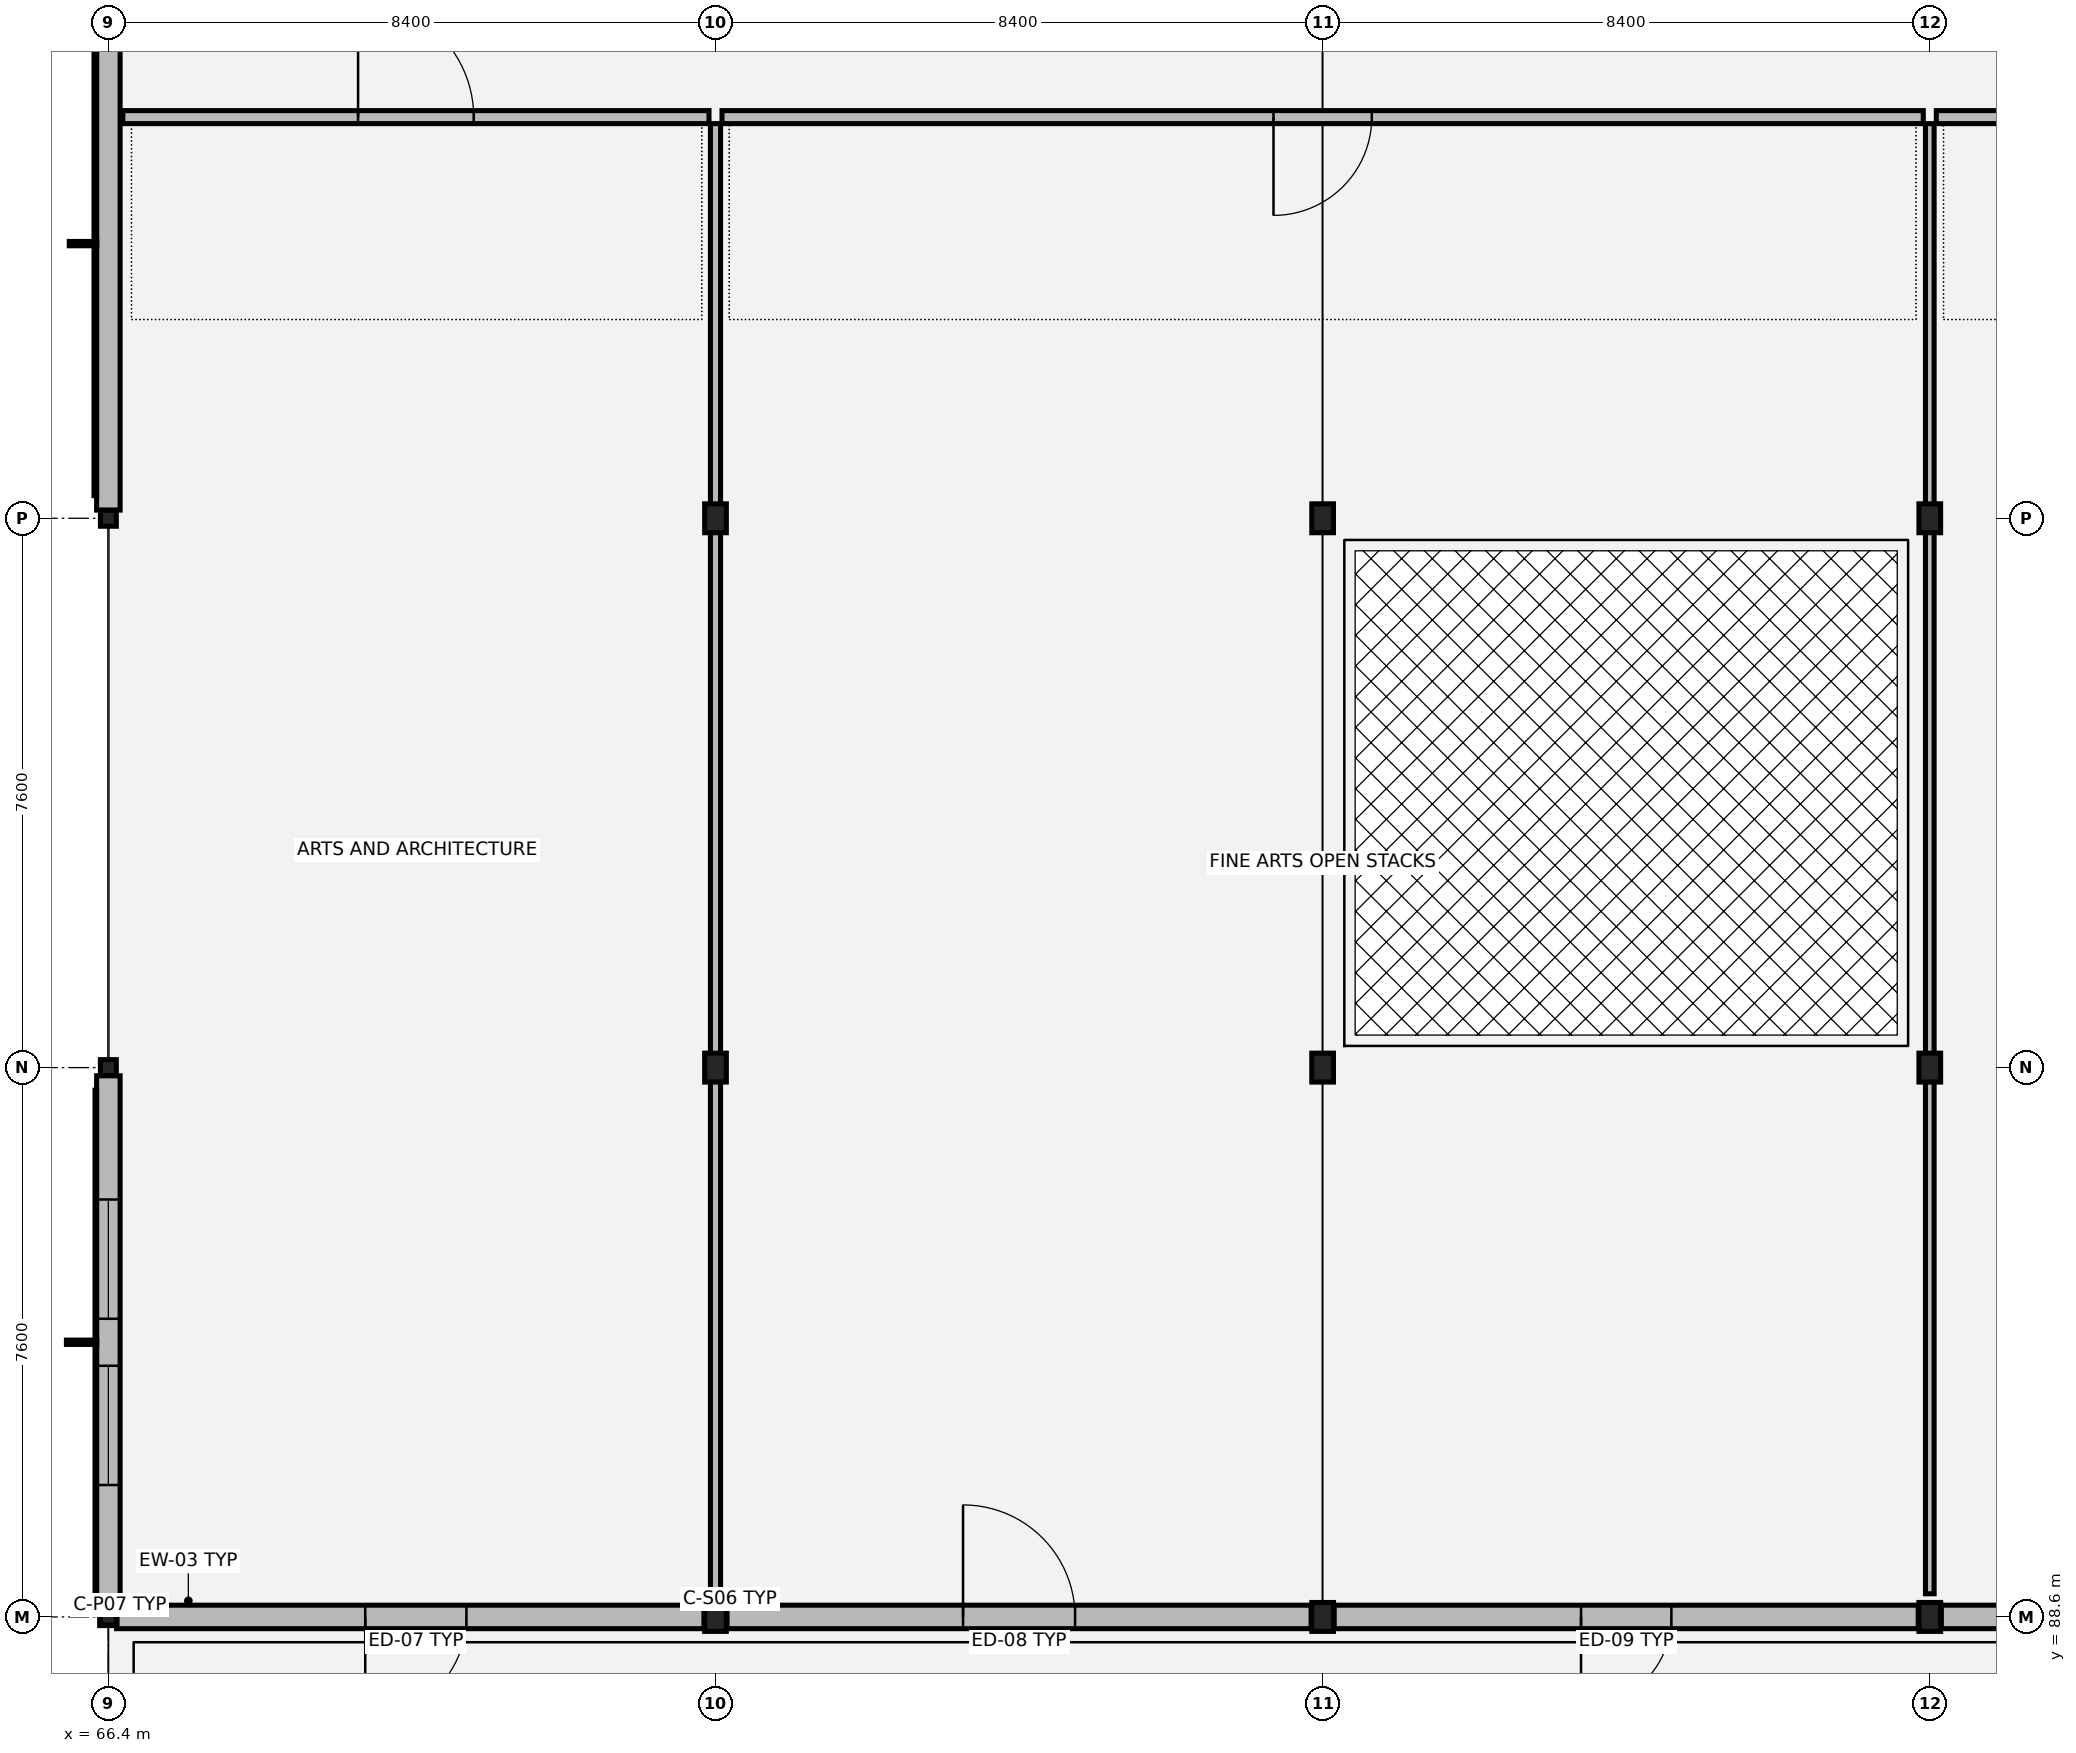
"""IFC4 building model, lengths in metres.
Left out: names, types, materials, properties, quantities, classifications, styles, units other than length and angle.
Written with IfcOpenShell. Run it as: python <this file> out.ifc"""

import sys

from ifc_helpers import new_model, si_unit, direction, frame, frame_2d, origin, origin_2d, place, context, subcontext, project, spatial, rectangle, hollow_rectangle, i_section, extrude, element, fill, save


model = new_model("IFC4")
c1 = context("Model", 3, precision=1e-05, world=origin(), true_north=direction((0.0, 1.0)))
c2 = subcontext(c1, "Body", "Model", "MODEL_VIEW")
j1 = project(units=[si_unit("LENGTHUNIT", "METRE"), si_unit("PLANEANGLEUNIT", "RADIAN")], contexts=[c1])
p1 = place(None, origin())
s1 = spatial("IfcSite", under=j1, at=p1, CompositionType="ELEMENT")
p2 = place(p1, origin())
s2 = spatial("IfcBuilding", under=s1, at=p2, CompositionType="ELEMENT")
p3 = place(p2, frame((0.0, 0.0, 13.26)))
s3 = spatial("IfcBuildingStorey", under=s2, at=p3, CompositionType="ELEMENT", Elevation=13.26)
p4 = place(p3, frame((66.4, 88.6, 0.0), z_axis=(0.0, 0.0, 1.0), x_axis=(1.0, 0.0, 0.0)))
e1 = element("IfcColumn", 1, at=p4, inside=s3, PredefinedType="COLUMN", context=c2, shape_type="SweptSolid", body=[
    extrude(hollow_rectangle(XDim=0.22, YDim=0.22, WallThickness=0.01, at=origin_2d()), origin(), (0.0, 0.0, 1.0), 3.885),
])
for number, where, z_axis, x_axis in (
    (2, (66.4, 96.2, 0.0), (0.0, 0.0, 1.0), (1.0, 0.0, 0.0)),
    (3, (66.4, 103.8, 0.0), (0.0, 0.0, 1.0), (1.0, 0.0, 0.0)),
):
    element("IfcColumn", number, at=place(p3, frame(where, z_axis=z_axis, x_axis=x_axis)), inside=s3, PredefinedType="COLUMN", context=c2, shape_type="SweptSolid", body=[
        extrude(hollow_rectangle(XDim=0.22, YDim=0.22, WallThickness=0.01, at=origin_2d()), origin(), (0.0, 0.0, 1.0), 4.055),
    ])
p5 = place(p3, frame((74.8, 88.6, 0.0), z_axis=(0.0, 0.0, 1.0), x_axis=(1.0, 0.0, 0.0)))
e4 = element("IfcColumn", 4, at=p5, inside=s3, PredefinedType="COLUMN", context=c2, shape_type="SweptSolid", body=[
    extrude(i_section(OverallWidth=0.3, OverallDepth=0.4, WebThickness=0.013, FlangeThickness=0.024, at=origin_2d()), origin(), (0.0, 0.0, 1.0), 3.885),
])
for number, where, z_axis, x_axis in (
    (5, (74.8, 96.2, 0.0), (0.0, 0.0, 1.0), (1.0, 0.0, 0.0)),
    (6, (74.8, 103.8, 0.0), (0.0, 0.0, 1.0), (1.0, 0.0, 0.0)),
):
    element("IfcColumn", number, at=place(p3, frame(where, z_axis=z_axis, x_axis=x_axis)), inside=s3, PredefinedType="COLUMN", context=c2, shape_type="SweptSolid", body=[
        extrude(i_section(OverallWidth=0.3, OverallDepth=0.4, WebThickness=0.013, FlangeThickness=0.024, at=origin_2d()), origin(), (0.0, 0.0, 1.0), 4.055),
    ])
p6 = place(p3, frame((83.2, 88.6, 0.0), z_axis=(0.0, 0.0, 1.0), x_axis=(1.0, 0.0, 0.0)))
e7 = element("IfcColumn", 7, at=p6, inside=s3, PredefinedType="COLUMN", context=c2, shape_type="SweptSolid", body=[
    extrude(i_section(OverallWidth=0.3, OverallDepth=0.4, WebThickness=0.013, FlangeThickness=0.024, at=origin_2d()), origin(), (0.0, 0.0, 1.0), 3.885),
])
for number, where, z_axis, x_axis in (
    (8, (83.2, 96.2, 0.0), (0.0, 0.0, 1.0), (1.0, 0.0, 0.0)),
    (9, (83.2, 103.8, 0.0), (0.0, 0.0, 1.0), (1.0, 0.0, 0.0)),
):
    element("IfcColumn", number, at=place(p3, frame(where, z_axis=z_axis, x_axis=x_axis)), inside=s3, PredefinedType="COLUMN", context=c2, shape_type="SweptSolid", body=[
        extrude(i_section(OverallWidth=0.3, OverallDepth=0.4, WebThickness=0.013, FlangeThickness=0.024, at=origin_2d()), origin(), (0.0, 0.0, 1.0), 4.055),
    ])
p7 = place(p3, frame((91.6, 88.6, 0.0), z_axis=(0.0, 0.0, 1.0), x_axis=(1.0, 0.0, 0.0)))
e10 = element("IfcColumn", 10, at=p7, inside=s3, PredefinedType="COLUMN", context=c2, shape_type="SweptSolid", body=[
    extrude(i_section(OverallWidth=0.3, OverallDepth=0.4, WebThickness=0.013, FlangeThickness=0.024, at=origin_2d()), origin(), (0.0, 0.0, 1.0), 3.885),
])
for number, where, z_axis, x_axis in (
    (11, (91.6, 96.2, 0.0), (0.0, 0.0, 1.0), (1.0, 0.0, 0.0)),
    (12, (91.6, 103.8, 0.0), (0.0, 0.0, 1.0), (1.0, 0.0, 0.0)),
):
    element("IfcColumn", number, at=place(p3, frame(where, z_axis=z_axis, x_axis=x_axis)), inside=s3, PredefinedType="COLUMN", context=c2, shape_type="SweptSolid", body=[
        extrude(i_section(OverallWidth=0.3, OverallDepth=0.4, WebThickness=0.013, FlangeThickness=0.024, at=origin_2d()), origin(), (0.0, 0.0, 1.0), 4.055),
    ])
p8 = place(p3, frame((66.513, 88.6, 0.0), z_axis=(0.0, 0.0, 1.0), x_axis=(1.0, 0.0, 0.0)))
e13 = element("IfcWall", 13, at=p8, inside=s3, PredefinedType="SOLIDWALL", context=c2, shape_type="SweptSolid", body=[
    extrude(rectangle(XDim=8.281, YDim=0.325, at=frame_2d((4.141, 0.0))), origin(), (0.0, 0.0, 1.0), 3.22),
])
p9 = place(p8, frame((3.441, 0.0, 0.0)))
e14 = element("IfcOpeningElement", 14, at=p9, cuts=e13, PredefinedType="OPENING", context=c2, shape_type="SweptSolid", body=[
    extrude(rectangle(XDim=1.4, YDim=2.25, at=frame_2d((0.7, 1.125))), frame((0.0, 0.172, 0.0), z_axis=(0.0, -1.0, 0.0), x_axis=(1.0, 0.0, 0.0)), (0.0, 0.0, 1.0), 0.345),
])
p10 = place(p3, frame((74.806, 88.6, 0.0), z_axis=(0.0, 0.0, 1.0), x_axis=(1.0, 0.0, 0.0)))
e15 = element("IfcWall", 15, at=p10, inside=s3, PredefinedType="SOLIDWALL", context=c2, shape_type="SweptSolid", body=[
    extrude(rectangle(XDim=8.388, YDim=0.325, at=frame_2d((4.194, 0.0))), origin(), (0.0, 0.0, 1.0), 3.22),
])
p11 = place(p10, frame((3.419, 0.0, 0.0)))
e16 = element("IfcOpeningElement", 16, at=p11, cuts=e15, PredefinedType="OPENING", context=c2, shape_type="SweptSolid", body=[
    extrude(rectangle(XDim=1.55, YDim=2.28, at=frame_2d((0.775, 1.14))), frame((0.0, 0.172, 0.0), z_axis=(0.0, -1.0, 0.0), x_axis=(1.0, 0.0, 0.0)), (0.0, 0.0, 1.0), 0.345),
])
p12 = place(p3, frame((83.206, 88.6, 0.0), z_axis=(0.0, 0.0, 1.0), x_axis=(1.0, 0.0, 0.0)))
e17 = element("IfcWall", 17, at=p12, inside=s3, PredefinedType="SOLIDWALL", context=c2, shape_type="SweptSolid", body=[
    extrude(rectangle(XDim=8.388, YDim=0.325, at=frame_2d((4.194, 0.0))), origin(), (0.0, 0.0, 1.0), 3.22),
])
p13 = place(p12, frame((3.569, 0.0, 0.0)))
e18 = element("IfcOpeningElement", 18, at=p13, cuts=e17, PredefinedType="OPENING", context=c2, shape_type="SweptSolid", body=[
    extrude(rectangle(XDim=1.25, YDim=2.2, at=frame_2d((0.625, 1.1))), frame((0.0, 0.172, 0.0), z_axis=(0.0, -1.0, 0.0), x_axis=(1.0, 0.0, 0.0)), (0.0, 0.0, 1.0), 0.345),
])
p14 = place(p3, frame((91.606, 88.6, 0.0), z_axis=(0.0, 0.0, 1.0), x_axis=(1.0, 0.0, 0.0)))
e19 = element("IfcWall", 19, at=p14, inside=s3, PredefinedType="SOLIDWALL", context=c2, shape_type="SweptSolid", body=[
    extrude(rectangle(XDim=8.388, YDim=0.325, at=frame_2d((4.194, 0.0))), origin(), (0.0, 0.0, 1.0), 3.22),
])
p15 = place(p14, frame((3.534, 0.0, 0.0)))
e20 = element("IfcOpeningElement", 20, at=p15, cuts=e19, PredefinedType="OPENING", context=c2, shape_type="SweptSolid", body=[
    extrude(rectangle(XDim=1.32, YDim=2.22, at=frame_2d((0.66, 1.11))), frame((0.0, 0.172, 0.0), z_axis=(0.0, -1.0, 0.0), x_axis=(1.0, 0.0, 0.0)), (0.0, 0.0, 1.0), 0.345),
])
p16 = place(p3, frame((66.4, 111.287, 0.0), z_axis=(0.0, 0.0, 1.0), x_axis=(0.0, -1.0, 0.0)))
e21 = element("IfcWall", 21, at=p16, inside=s3, PredefinedType="SOLIDWALL", context=c2, shape_type="SweptSolid", body=[
    extrude(rectangle(XDim=7.374, YDim=0.325, at=frame_2d((3.687, 0.0))), origin(), (0.0, 0.0, 1.0), 3.48),
])
p17 = place(p3, frame((66.4, 96.087, 0.0), z_axis=(0.0, 0.0, 1.0), x_axis=(0.0, -1.0, 0.0)))
e22 = element("IfcWall", 22, at=p17, inside=s3, PredefinedType="SOLIDWALL", context=c2, shape_type="SweptSolid", body=[
    extrude(rectangle(XDim=7.374, YDim=0.325, at=frame_2d((3.687, 0.0))), origin(), (0.0, 0.0, 1.0), 3.48),
])
p18 = place(p17, frame((1.712, 0.0, 0.8)))
e23 = element("IfcOpeningElement", 23, at=p18, cuts=e22, PredefinedType="OPENING", context=c2, shape_type="SweptSolid", body=[
    extrude(rectangle(XDim=1.65, YDim=2.25, at=frame_2d((0.825, 1.125))), frame((0.0, 0.172, 0.0), z_axis=(0.0, -1.0, 0.0), x_axis=(1.0, 0.0, 0.0)), (0.0, 0.0, 1.0), 0.345),
])
p19 = place(p17, frame((4.012, 0.0, 0.8)))
e24 = element("IfcOpeningElement", 24, at=p19, cuts=e22, PredefinedType="OPENING", context=c2, shape_type="SweptSolid", body=[
    extrude(rectangle(XDim=1.65, YDim=2.25, at=frame_2d((0.825, 1.125))), frame((0.0, 0.172, 0.0), z_axis=(0.0, -1.0, 0.0), x_axis=(1.0, 0.0, 0.0)), (0.0, 0.0, 1.0), 0.345),
])
p20 = place(p3, frame((66.6, 109.35, 0.0), z_axis=(0.0, 0.0, 1.0), x_axis=(1.0, 0.0, 0.0)))
e25 = element("IfcWall", 25, at=p20, inside=s3, PredefinedType="PARTITIONING", context=c2, shape_type="SweptSolid", body=[
    extrude(rectangle(XDim=8.11, YDim=0.18, at=frame_2d((4.055, 0.0))), origin(), (0.0, 0.0, 1.0), 3.18),
])
p21 = place(p20, frame((3.255, 0.0, 0.0)))
e26 = element("IfcOpeningElement", 26, at=p21, cuts=e25, PredefinedType="OPENING", context=c2, shape_type="SweptSolid", body=[
    extrude(rectangle(XDim=1.6, YDim=2.25, at=frame_2d((0.8, 1.125))), frame((0.0, 0.1, 0.0), z_axis=(0.0, -1.0, 0.0), x_axis=(1.0, 0.0, 0.0)), (0.0, 0.0, 1.0), 0.2),
])
p22 = place(p3, frame((74.89, 109.35, 0.0), z_axis=(0.0, 0.0, 1.0), x_axis=(1.0, 0.0, 0.0)))
e27 = element("IfcWall", 27, at=p22, inside=s3, PredefinedType="PARTITIONING", context=c2, shape_type="SweptSolid", body=[
    extrude(rectangle(XDim=16.62, YDim=0.18, at=frame_2d((8.31, 0.0))), origin(), (0.0, 0.0, 1.0), 3.18),
])
p23 = place(p22, frame((7.63, 0.0, 0.0)))
e28 = element("IfcOpeningElement", 28, at=p23, cuts=e27, PredefinedType="OPENING", context=c2, shape_type="SweptSolid", body=[
    extrude(rectangle(XDim=1.36, YDim=2.2, at=frame_2d((0.68, 1.1))), frame((0.0, 0.1, 0.0), z_axis=(0.0, -1.0, 0.0), x_axis=(1.0, 0.0, 0.0)), (0.0, 0.0, 1.0), 0.2),
])
p24 = place(p3, frame((91.69, 109.35, 0.0), z_axis=(0.0, 0.0, 1.0), x_axis=(1.0, 0.0, 0.0)))
e29 = element("IfcWall", 29, at=p24, inside=s3, PredefinedType="PARTITIONING", context=c2, shape_type="SweptSolid", body=[
    extrude(rectangle(XDim=8.22, YDim=0.18, at=frame_2d((4.11, 0.0))), origin(), (0.0, 0.0, 1.0), 3.18),
])
p25 = place(p24, frame((3.48, 0.0, 0.0)))
e30 = element("IfcOpeningElement", 30, at=p25, cuts=e29, PredefinedType="OPENING", context=c2, shape_type="SweptSolid", body=[
    extrude(rectangle(XDim=1.26, YDim=2.2, at=frame_2d((0.63, 1.1))), frame((0.0, 0.1, 0.0), z_axis=(0.0, -1.0, 0.0), x_axis=(1.0, 0.0, 0.0)), (0.0, 0.0, 1.0), 0.2),
])
p26 = place(p3, frame((74.8, 88.92, 0.0), z_axis=(0.0, 0.0, 1.0), x_axis=(0.0, 1.0, 0.0)))
e31 = element("IfcWall", 31, at=p26, inside=s3, PredefinedType="PARTITIONING", context=c2, shape_type="SweptSolid", body=[
    extrude(rectangle(XDim=20.34, YDim=0.14, at=frame_2d((10.17, 0.0))), origin(), (0.0, 0.0, 1.0), 3.18),
])
p27 = place(p3, frame((91.6, 88.92, 0.0), z_axis=(0.0, 0.0, 1.0), x_axis=(0.0, 1.0, 0.0)))
e32 = element("IfcWall", 32, at=p27, inside=s3, PredefinedType="PARTITIONING", context=c2, shape_type="SweptSolid", body=[
    extrude(rectangle(XDim=20.34, YDim=0.12, at=frame_2d((10.17, 0.0))), origin(), (0.0, 0.0, 1.0), 3.18),
])
p28 = place(p9, origin())
e33 = element("IfcDoor", 33, at=p28, inside=s3, OperationType="SINGLE_SWING_RIGHT", PredefinedType="DOOR", context=c2, shape_type="SweptSolid", body=[
    extrude(rectangle(XDim=1.4, YDim=2.25, at=frame_2d((0.7, 1.125))), frame((0.0, 0.025, 0.0), z_axis=(0.0, -1.0, 0.0), x_axis=(1.0, 0.0, 0.0)), (0.0, 0.0, 1.0), 0.05),
])
fill(e14, e33)
p29 = place(p11, origin())
e34 = element("IfcDoor", 34, at=p29, inside=s3, OperationType="SINGLE_SWING_LEFT", PredefinedType="DOOR", context=c2, shape_type="SweptSolid", body=[
    extrude(rectangle(XDim=1.55, YDim=2.28, at=frame_2d((0.775, 1.14))), frame((0.0, 0.025, 0.0), z_axis=(0.0, -1.0, 0.0), x_axis=(1.0, 0.0, 0.0)), (0.0, 0.0, 1.0), 0.05),
])
fill(e16, e34)
p30 = place(p13, origin())
e35 = element("IfcDoor", 35, at=p30, inside=s3, OperationType="SINGLE_SWING_RIGHT", PredefinedType="DOOR", context=c2, shape_type="SweptSolid", body=[
    extrude(rectangle(XDim=1.25, YDim=2.2, at=frame_2d((0.625, 1.1))), frame((0.0, 0.025, 0.0), z_axis=(0.0, -1.0, 0.0), x_axis=(1.0, 0.0, 0.0)), (0.0, 0.0, 1.0), 0.05),
])
fill(e18, e35)
p31 = place(p18, origin())
e36 = element("IfcWindow", 36, at=p31, inside=s3, PartitioningType="SINGLE_PANEL", PredefinedType="WINDOW", context=c2, shape_type="SweptSolid", body=[
    extrude(rectangle(XDim=1.65, YDim=2.25, at=frame_2d((0.825, 1.125))), frame((0.0, 0.03, 0.0), z_axis=(0.0, -1.0, 0.0), x_axis=(1.0, 0.0, 0.0)), (0.0, 0.0, 1.0), 0.06),
])
fill(e23, e36)
p32 = place(p19, origin())
e37 = element("IfcWindow", 37, at=p32, inside=s3, PartitioningType="SINGLE_PANEL", PredefinedType="WINDOW", context=c2, shape_type="SweptSolid", body=[
    extrude(rectangle(XDim=1.65, YDim=2.25, at=frame_2d((0.825, 1.125))), frame((0.0, 0.03, 0.0), z_axis=(0.0, -1.0, 0.0), x_axis=(1.0, 0.0, 0.0)), (0.0, 0.0, 1.0), 0.06),
])
fill(e24, e37)
p33 = place(p21, origin())
e38 = element("IfcDoor", 38, at=p33, inside=s3, OperationType="DOUBLE_DOOR_SINGLE_SWING", PredefinedType="DOOR", context=c2, shape_type="SweptSolid", body=[
    extrude(rectangle(XDim=1.6, YDim=2.25, at=frame_2d((0.8, 1.125))), frame((0.0, 0.025, 0.0), z_axis=(0.0, -1.0, 0.0), x_axis=(1.0, 0.0, 0.0)), (0.0, 0.0, 1.0), 0.05),
])
fill(e26, e38)
p34 = place(p23, origin())
e39 = element("IfcDoor", 39, at=p34, inside=s3, OperationType="SINGLE_SWING_RIGHT", PredefinedType="DOOR", context=c2, shape_type="SweptSolid", body=[
    extrude(rectangle(XDim=1.36, YDim=2.2, at=frame_2d((0.68, 1.1))), frame((0.0, 0.025, 0.0), z_axis=(0.0, -1.0, 0.0), x_axis=(1.0, 0.0, 0.0)), (0.0, 0.0, 1.0), 0.05),
])
fill(e28, e39)
save(model, sys.argv[1])
